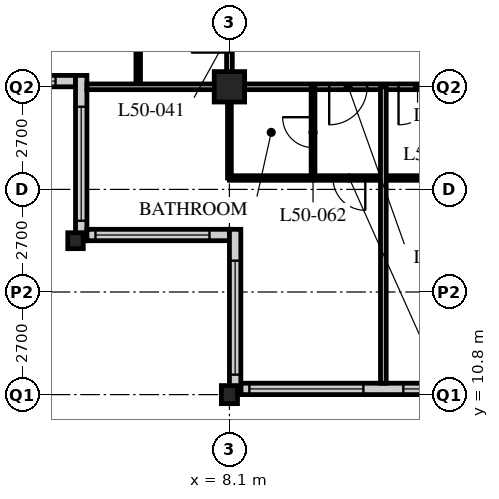
"""IFC4 building model, lengths in metres.
Left out: names, types, materials, properties, quantities, classifications, styles, units other than length and angle.
Written with IfcOpenShell. Run it as: python <this file> out.ifc"""

import sys

from ifc_helpers import new_model, si_unit, direction, frame, frame_2d, origin, origin_2d, place, context, subcontext, project, spatial, rectangle, hollow_rectangle, i_section, extrude, element, fill, save


model = new_model("IFC4")
c1 = context("Model", 3, precision=1e-05, world=origin(), true_north=direction((0.0, 1.0)))
c2 = subcontext(c1, "Body", "Model", "MODEL_VIEW")
j1 = project(units=[si_unit("LENGTHUNIT", "METRE"), si_unit("PLANEANGLEUNIT", "RADIAN")], contexts=[c1])
p1 = place(None, origin())
s1 = spatial("IfcSite", under=j1, at=p1, CompositionType="ELEMENT")
p2 = place(p1, origin())
s2 = spatial("IfcBuilding", under=s1, at=p2, CompositionType="ELEMENT")
p3 = place(p2, frame((0.0, 0.0, 195.6)))
s3 = spatial("IfcBuildingStorey", under=s2, at=p3, CompositionType="ELEMENT", Elevation=195.6)
p4 = place(p3, frame((4.05, 14.85, 0.0), z_axis=(0.0, 0.0, 1.0), x_axis=(1.0, 0.0, 0.0)))
e1 = element("IfcColumn", 1, at=p4, inside=s3, PredefinedType="COLUMN", context=c2, shape_type="SweptSolid", body=[
    extrude(i_section(OverallWidth=0.407, OverallDepth=0.419, WebThickness=0.031, FlangeThickness=0.049, FilletRadius=0.015, at=origin_2d()), origin(), (0.0, 0.0, 1.0), 3.6),
])
p5 = place(p3, frame((8.1, 10.8, 0.0), z_axis=(0.0, 0.0, 1.0), x_axis=(1.0, 0.0, 0.0)))
e2 = element("IfcColumn", 2, at=p5, inside=s3, PredefinedType="COLUMN", context=c2, shape_type="SweptSolid", body=[
    extrude(i_section(OverallWidth=0.424, OverallDepth=0.475, WebThickness=0.048, FlangeThickness=0.077, FilletRadius=0.015, at=origin_2d()), origin(), (0.0, 0.0, 1.0), 3.6),
])
p6 = place(p3, frame((8.1, 18.9, 0.0), z_axis=(0.0, 0.0, 1.0), x_axis=(1.0, 0.0, 0.0)))
e3 = element("IfcColumn", 3, at=p6, inside=s3, PredefinedType="COLUMN", context=c2, shape_type="SweptSolid", body=[
    extrude(hollow_rectangle(XDim=0.8, YDim=0.8, WallThickness=0.08, at=origin_2d()), origin(), (0.0, 0.0, 1.0), 3.6),
])
p7 = place(p3, frame((8.4, 10.95, 0.0), z_axis=(0.0, 0.0, 1.0), x_axis=(1.0, 0.0, 0.0)))
e4 = element("IfcWall", 4, at=p7, inside=s3, PredefinedType="SOLIDWALL", context=c2, shape_type="SweptSolid", body=[
    extrude(rectangle(XDim=40.2, YDim=0.3, at=frame_2d((20.1, 0.0))), origin(), (0.0, 0.0, 1.0), 3.39),
])
p8 = place(p7, frame((0.225, 0.0, 0.6)))
e5 = element("IfcOpeningElement", 5, at=p8, cuts=e4, PredefinedType="OPENING", context=c2, shape_type="SweptSolid", body=[
    extrude(rectangle(XDim=3.0, YDim=2.4, at=frame_2d((1.5, 1.2))), frame((0.0, 0.16, 0.0), z_axis=(0.0, -1.0, 0.0), x_axis=(1.0, 0.0, 0.0)), (0.0, 0.0, 1.0), 0.32),
])
p9 = place(p7, frame((4.275, 0.0, 0.6)))
e6 = element("IfcOpeningElement", 6, at=p9, cuts=e4, PredefinedType="OPENING", context=c2, shape_type="SweptSolid", body=[
    extrude(rectangle(XDim=3.0, YDim=2.4, at=frame_2d((1.5, 1.2))), frame((0.0, 0.16, 0.0), z_axis=(0.0, -1.0, 0.0), x_axis=(1.0, 0.0, 0.0)), (0.0, 0.0, 1.0), 0.32),
])
p10 = place(p7, frame((8.325, 0.0, 0.6)))
e7 = element("IfcOpeningElement", 7, at=p10, cuts=e4, PredefinedType="OPENING", context=c2, shape_type="SweptSolid", body=[
    extrude(rectangle(XDim=3.0, YDim=2.4, at=frame_2d((1.5, 1.2))), frame((0.0, 0.16, 0.0), z_axis=(0.0, -1.0, 0.0), x_axis=(1.0, 0.0, 0.0)), (0.0, 0.0, 1.0), 0.32),
])
p11 = place(p7, frame((12.375, 0.0, 0.6)))
e8 = element("IfcOpeningElement", 8, at=p11, cuts=e4, PredefinedType="OPENING", context=c2, shape_type="SweptSolid", body=[
    extrude(rectangle(XDim=3.0, YDim=2.4, at=frame_2d((1.5, 1.2))), frame((0.0, 0.16, 0.0), z_axis=(0.0, -1.0, 0.0), x_axis=(1.0, 0.0, 0.0)), (0.0, 0.0, 1.0), 0.32),
])
p12 = place(p7, frame((16.425, 0.0, 0.6)))
e9 = element("IfcOpeningElement", 9, at=p12, cuts=e4, PredefinedType="OPENING", context=c2, shape_type="SweptSolid", body=[
    extrude(rectangle(XDim=3.0, YDim=2.4, at=frame_2d((1.5, 1.2))), frame((0.0, 0.16, 0.0), z_axis=(0.0, -1.0, 0.0), x_axis=(1.0, 0.0, 0.0)), (0.0, 0.0, 1.0), 0.32),
])
p13 = place(p7, frame((20.475, 0.0, 0.6)))
e10 = element("IfcOpeningElement", 10, at=p13, cuts=e4, PredefinedType="OPENING", context=c2, shape_type="SweptSolid", body=[
    extrude(rectangle(XDim=3.0, YDim=2.4, at=frame_2d((1.5, 1.2))), frame((0.0, 0.16, 0.0), z_axis=(0.0, -1.0, 0.0), x_axis=(1.0, 0.0, 0.0)), (0.0, 0.0, 1.0), 0.32),
])
p14 = place(p7, frame((24.525, 0.0, 0.6)))
e11 = element("IfcOpeningElement", 11, at=p14, cuts=e4, PredefinedType="OPENING", context=c2, shape_type="SweptSolid", body=[
    extrude(rectangle(XDim=3.0, YDim=2.4, at=frame_2d((1.5, 1.2))), frame((0.0, 0.16, 0.0), z_axis=(0.0, -1.0, 0.0), x_axis=(1.0, 0.0, 0.0)), (0.0, 0.0, 1.0), 0.32),
])
p15 = place(p7, frame((28.575, 0.0, 0.6)))
e12 = element("IfcOpeningElement", 12, at=p15, cuts=e4, PredefinedType="OPENING", context=c2, shape_type="SweptSolid", body=[
    extrude(rectangle(XDim=3.0, YDim=2.4, at=frame_2d((1.5, 1.2))), frame((0.0, 0.16, 0.0), z_axis=(0.0, -1.0, 0.0), x_axis=(1.0, 0.0, 0.0)), (0.0, 0.0, 1.0), 0.32),
])
p16 = place(p7, frame((32.625, 0.0, 0.6)))
e13 = element("IfcOpeningElement", 13, at=p16, cuts=e4, PredefinedType="OPENING", context=c2, shape_type="SweptSolid", body=[
    extrude(rectangle(XDim=3.0, YDim=2.4, at=frame_2d((1.5, 1.2))), frame((0.0, 0.16, 0.0), z_axis=(0.0, -1.0, 0.0), x_axis=(1.0, 0.0, 0.0)), (0.0, 0.0, 1.0), 0.32),
])
p17 = place(p7, frame((36.675, 0.0, 0.6)))
e14 = element("IfcOpeningElement", 14, at=p17, cuts=e4, PredefinedType="OPENING", context=c2, shape_type="SweptSolid", body=[
    extrude(rectangle(XDim=3.0, YDim=2.4, at=frame_2d((1.5, 1.2))), frame((0.0, 0.16, 0.0), z_axis=(0.0, -1.0, 0.0), x_axis=(1.0, 0.0, 0.0)), (0.0, 0.0, 1.0), 0.32),
])
p18 = place(p3, frame((0.3, 19.05, 0.0), z_axis=(0.0, 0.0, 1.0), x_axis=(1.0, 0.0, 0.0)))
e15 = element("IfcWall", 15, at=p18, inside=s3, PredefinedType="SOLIDWALL", context=c2, shape_type="SweptSolid", body=[
    extrude(rectangle(XDim=3.75, YDim=0.3, at=frame_2d((1.875, 0.0))), origin(), (0.0, 0.0, 1.0), 3.39),
])
p19 = place(p18, frame((0.225, 0.0, 0.6)))
e16 = element("IfcOpeningElement", 16, at=p19, cuts=e15, PredefinedType="OPENING", context=c2, shape_type="SweptSolid", body=[
    extrude(rectangle(XDim=3.0, YDim=2.0, at=frame_2d((1.5, 1.0))), frame((0.0, 0.16, 0.0), z_axis=(0.0, -1.0, 0.0), x_axis=(1.0, 0.0, 0.0)), (0.0, 0.0, 1.0), 0.32),
])
p20 = place(p3, frame((4.2, 19.2, 0.0), z_axis=(0.0, 0.0, 1.0), x_axis=(0.0, -1.0, 0.0)))
e17 = element("IfcWall", 17, at=p20, inside=s3, PredefinedType="SOLIDWALL", context=c2, shape_type="SweptSolid", body=[
    extrude(rectangle(XDim=4.35, YDim=0.3, at=frame_2d((2.175, 0.0))), origin(), (0.0, 0.0, 1.0), 3.39),
])
p21 = place(p20, frame((0.825, 0.0, 0.6)))
e18 = element("IfcOpeningElement", 18, at=p21, cuts=e17, PredefinedType="OPENING", context=c2, shape_type="SweptSolid", body=[
    extrude(rectangle(XDim=3.0, YDim=2.0, at=frame_2d((1.5, 1.0))), frame((0.0, 0.16, 0.0), z_axis=(0.0, -1.0, 0.0), x_axis=(1.0, 0.0, 0.0)), (0.0, 0.0, 1.0), 0.32),
])
p22 = place(p3, frame((4.35, 15.0, 0.0), z_axis=(0.0, 0.0, 1.0), x_axis=(1.0, 0.0, 0.0)))
e19 = element("IfcWall", 19, at=p22, inside=s3, PredefinedType="SOLIDWALL", context=c2, shape_type="SweptSolid", body=[
    extrude(rectangle(XDim=3.75, YDim=0.3, at=frame_2d((1.875, 0.0))), origin(), (0.0, 0.0, 1.0), 3.39),
])
p23 = place(p22, frame((0.225, 0.0, 0.6)))
e20 = element("IfcOpeningElement", 20, at=p23, cuts=e19, PredefinedType="OPENING", context=c2, shape_type="SweptSolid", body=[
    extrude(rectangle(XDim=3.0, YDim=2.0, at=frame_2d((1.5, 1.0))), frame((0.0, 0.16, 0.0), z_axis=(0.0, -1.0, 0.0), x_axis=(1.0, 0.0, 0.0)), (0.0, 0.0, 1.0), 0.32),
])
p24 = place(p3, frame((8.25, 15.15, 0.0), z_axis=(0.0, 0.0, 1.0), x_axis=(0.0, -1.0, 0.0)))
e21 = element("IfcWall", 21, at=p24, inside=s3, PredefinedType="SOLIDWALL", context=c2, shape_type="SweptSolid", body=[
    extrude(rectangle(XDim=4.35, YDim=0.3, at=frame_2d((2.175, 0.0))), origin(), (0.0, 0.0, 1.0), 3.39),
])
p25 = place(p24, frame((0.825, 0.0, 0.6)))
e22 = element("IfcOpeningElement", 22, at=p25, cuts=e21, PredefinedType="OPENING", context=c2, shape_type="SweptSolid", body=[
    extrude(rectangle(XDim=3.0, YDim=2.0, at=frame_2d((1.5, 1.0))), frame((0.0, 0.16, 0.0), z_axis=(0.0, -1.0, 0.0), x_axis=(1.0, 0.0, 0.0)), (0.0, 0.0, 1.0), 0.32),
])
p26 = place(p3, frame((8.1, 18.9, 0.0), z_axis=(0.0, 0.0, 1.0), x_axis=(1.0, 0.0, 0.0)))
e23 = element("IfcWall", 23, at=p26, inside=s3, PredefinedType="PARTITIONING", context=c2, shape_type="SweptSolid", body=[
    extrude(rectangle(XDim=40.5, YDim=0.15, at=frame_2d((20.25, 0.0))), origin(), (0.0, 0.0, 1.0), 2.778),
])
p27 = place(p26, frame((4.45, 0.0, 0.0)))
e24 = element("IfcOpeningElement", 24, at=p27, cuts=e23, PredefinedType="OPENING", context=c2, shape_type="SweptSolid", body=[
    extrude(rectangle(XDim=1.0, YDim=2.1, at=frame_2d((0.5, 1.05))), frame((0.0, 0.085, 0.0), z_axis=(0.0, -1.0, 0.0), x_axis=(1.0, 0.0, 0.0)), (0.0, 0.0, 1.0), 0.17),
])
p28 = place(p26, frame((17.1, 0.0, 0.0)))
e25 = element("IfcOpeningElement", 25, at=p28, cuts=e23, PredefinedType="OPENING", context=c2, shape_type="SweptSolid", body=[
    extrude(rectangle(XDim=1.0, YDim=2.1, at=frame_2d((0.5, 1.05))), frame((0.0, 0.085, 0.0), z_axis=(0.0, -1.0, 0.0), x_axis=(1.0, 0.0, 0.0)), (0.0, 0.0, 1.0), 0.17),
])
p29 = place(p26, frame((28.75, 0.0, 0.0)))
e26 = element("IfcOpeningElement", 26, at=p29, cuts=e23, PredefinedType="OPENING", context=c2, shape_type="SweptSolid", body=[
    extrude(rectangle(XDim=1.0, YDim=2.1, at=frame_2d((0.5, 1.05))), frame((0.0, 0.085, 0.0), z_axis=(0.0, -1.0, 0.0), x_axis=(1.0, 0.0, 0.0)), (0.0, 0.0, 1.0), 0.17),
])
p30 = place(p26, frame((2.625, 0.0, 0.0)))
e27 = element("IfcOpeningElement", 27, at=p30, cuts=e23, PredefinedType="OPENING", context=c2, shape_type="SweptSolid", body=[
    extrude(rectangle(XDim=1.0, YDim=2.1, at=frame_2d((0.5, 1.05))), frame((0.0, 0.085, 0.0), z_axis=(0.0, -1.0, 0.0), x_axis=(1.0, 0.0, 0.0)), (0.0, 0.0, 1.0), 0.17),
])
p31 = place(p26, frame((36.875, 0.0, 0.0)))
e28 = element("IfcOpeningElement", 28, at=p31, cuts=e23, PredefinedType="OPENING", context=c2, shape_type="SweptSolid", body=[
    extrude(rectangle(XDim=1.0, YDim=2.1, at=frame_2d((0.5, 1.05))), frame((0.0, 0.085, 0.0), z_axis=(0.0, -1.0, 0.0), x_axis=(1.0, 0.0, 0.0)), (0.0, 0.0, 1.0), 0.17),
])
p32 = place(p3, frame((8.1, 18.9, 0.0), z_axis=(0.0, 0.0, 1.0), x_axis=(0.0, 1.0, 0.0)))
e29 = element("IfcWall", 29, at=p32, inside=s3, PredefinedType="PARTITIONING", context=c2, shape_type="SweptSolid", body=[
    extrude(rectangle(XDim=24.3, YDim=0.15, at=frame_2d((12.15, 0.0))), origin(), (0.0, 0.0, 1.0), 2.778),
])
p33 = place(p32, frame((0.9, 0.0, 0.0)))
e30 = element("IfcOpeningElement", 30, at=p33, cuts=e29, PredefinedType="OPENING", context=c2, shape_type="SweptSolid", body=[
    extrude(rectangle(XDim=1.0, YDim=2.1, at=frame_2d((0.5, 1.05))), frame((0.0, 0.085, 0.0), z_axis=(0.0, -1.0, 0.0), x_axis=(1.0, 0.0, 0.0)), (0.0, 0.0, 1.0), 0.17),
])
p34 = place(p32, frame((9.0, 0.0, 0.0)))
e31 = element("IfcOpeningElement", 31, at=p34, cuts=e29, PredefinedType="OPENING", context=c2, shape_type="SweptSolid", body=[
    extrude(rectangle(XDim=1.0, YDim=2.1, at=frame_2d((0.5, 1.05))), frame((0.0, 0.085, 0.0), z_axis=(0.0, -1.0, 0.0), x_axis=(1.0, 0.0, 0.0)), (0.0, 0.0, 1.0), 0.17),
])
p35 = place(p32, frame((17.1, 0.0, 0.0)))
e32 = element("IfcOpeningElement", 32, at=p35, cuts=e29, PredefinedType="OPENING", context=c2, shape_type="SweptSolid", body=[
    extrude(rectangle(XDim=1.0, YDim=2.1, at=frame_2d((0.5, 1.05))), frame((0.0, 0.085, 0.0), z_axis=(0.0, -1.0, 0.0), x_axis=(1.0, 0.0, 0.0)), (0.0, 0.0, 1.0), 0.17),
])
p36 = place(p3, frame((5.7, 18.9, 0.0), z_axis=(0.0, 0.0, 1.0), x_axis=(0.0, 1.0, 0.0)))
e33 = element("IfcWall", 33, at=p36, inside=s3, PredefinedType="PARTITIONING", context=c2, shape_type="SweptSolid", body=[
    extrude(rectangle(XDim=24.3, YDim=0.12, at=frame_2d((12.15, 0.0))), origin(), (0.0, 0.0, 1.0), 3.39),
])
p37 = place(p36, frame((0.975, 0.0, 0.0)))
e34 = element("IfcOpeningElement", 34, at=p37, cuts=e33, PredefinedType="OPENING", context=c2, shape_type="SweptSolid", body=[
    extrude(rectangle(XDim=0.85, YDim=2.1, at=frame_2d((0.425, 1.05))), frame((0.0, 0.07, 0.0), z_axis=(0.0, -1.0, 0.0), x_axis=(1.0, 0.0, 0.0)), (0.0, 0.0, 1.0), 0.14),
])
p38 = place(p36, frame((4.375, 0.0, 0.0)))
e35 = element("IfcOpeningElement", 35, at=p38, cuts=e33, PredefinedType="OPENING", context=c2, shape_type="SweptSolid", body=[
    extrude(rectangle(XDim=0.85, YDim=2.1, at=frame_2d((0.425, 1.05))), frame((0.0, 0.07, 0.0), z_axis=(0.0, -1.0, 0.0), x_axis=(1.0, 0.0, 0.0)), (0.0, 0.0, 1.0), 0.14),
])
p39 = place(p36, frame((9.075, 0.0, 0.0)))
e36 = element("IfcOpeningElement", 36, at=p39, cuts=e33, PredefinedType="OPENING", context=c2, shape_type="SweptSolid", body=[
    extrude(rectangle(XDim=0.85, YDim=2.1, at=frame_2d((0.425, 1.05))), frame((0.0, 0.07, 0.0), z_axis=(0.0, -1.0, 0.0), x_axis=(1.0, 0.0, 0.0)), (0.0, 0.0, 1.0), 0.14),
])
p40 = place(p36, frame((12.475, 0.0, 0.0)))
e37 = element("IfcOpeningElement", 37, at=p40, cuts=e33, PredefinedType="OPENING", context=c2, shape_type="SweptSolid", body=[
    extrude(rectangle(XDim=0.85, YDim=2.1, at=frame_2d((0.425, 1.05))), frame((0.0, 0.07, 0.0), z_axis=(0.0, -1.0, 0.0), x_axis=(1.0, 0.0, 0.0)), (0.0, 0.0, 1.0), 0.14),
])
p41 = place(p36, frame((17.175, 0.0, 0.0)))
e38 = element("IfcOpeningElement", 38, at=p41, cuts=e33, PredefinedType="OPENING", context=c2, shape_type="SweptSolid", body=[
    extrude(rectangle(XDim=0.85, YDim=2.1, at=frame_2d((0.425, 1.05))), frame((0.0, 0.07, 0.0), z_axis=(0.0, -1.0, 0.0), x_axis=(1.0, 0.0, 0.0)), (0.0, 0.0, 1.0), 0.14),
])
p42 = place(p36, frame((20.575, 0.0, 0.0)))
e39 = element("IfcOpeningElement", 39, at=p42, cuts=e33, PredefinedType="OPENING", context=c2, shape_type="SweptSolid", body=[
    extrude(rectangle(XDim=0.85, YDim=2.1, at=frame_2d((0.425, 1.05))), frame((0.0, 0.07, 0.0), z_axis=(0.0, -1.0, 0.0), x_axis=(1.0, 0.0, 0.0)), (0.0, 0.0, 1.0), 0.14),
])
p43 = place(p3, frame((8.1, 16.5, 0.0), z_axis=(0.0, 0.0, 1.0), x_axis=(1.0, 0.0, 0.0)))
e40 = element("IfcWall", 40, at=p43, inside=s3, PredefinedType="PARTITIONING", context=c2, shape_type="SweptSolid", body=[
    extrude(rectangle(XDim=40.5, YDim=0.12, at=frame_2d((20.25, 0.0))), origin(), (0.0, 0.0, 1.0), 3.39),
])
p44 = place(p43, frame((5.025, 0.0, 0.0)))
e41 = element("IfcOpeningElement", 41, at=p44, cuts=e40, PredefinedType="OPENING", context=c2, shape_type="SweptSolid", body=[
    extrude(rectangle(XDim=0.85, YDim=2.1, at=frame_2d((0.425, 1.05))), frame((0.0, 0.07, 0.0), z_axis=(0.0, -1.0, 0.0), x_axis=(1.0, 0.0, 0.0)), (0.0, 0.0, 1.0), 0.14),
])
p45 = place(p43, frame((12.475, 0.0, 0.0)))
e42 = element("IfcOpeningElement", 42, at=p45, cuts=e40, PredefinedType="OPENING", context=c2, shape_type="SweptSolid", body=[
    extrude(rectangle(XDim=0.85, YDim=2.1, at=frame_2d((0.425, 1.05))), frame((0.0, 0.07, 0.0), z_axis=(0.0, -1.0, 0.0), x_axis=(1.0, 0.0, 0.0)), (0.0, 0.0, 1.0), 0.14),
])
p46 = place(p43, frame((17.175, 0.0, 0.0)))
e43 = element("IfcOpeningElement", 43, at=p46, cuts=e40, PredefinedType="OPENING", context=c2, shape_type="SweptSolid", body=[
    extrude(rectangle(XDim=0.85, YDim=2.1, at=frame_2d((0.425, 1.05))), frame((0.0, 0.07, 0.0), z_axis=(0.0, -1.0, 0.0), x_axis=(1.0, 0.0, 0.0)), (0.0, 0.0, 1.0), 0.14),
])
p47 = place(p43, frame((24.625, 0.0, 0.0)))
e44 = element("IfcOpeningElement", 44, at=p47, cuts=e40, PredefinedType="OPENING", context=c2, shape_type="SweptSolid", body=[
    extrude(rectangle(XDim=0.85, YDim=2.1, at=frame_2d((0.425, 1.05))), frame((0.0, 0.07, 0.0), z_axis=(0.0, -1.0, 0.0), x_axis=(1.0, 0.0, 0.0)), (0.0, 0.0, 1.0), 0.14),
])
p48 = place(p43, frame((29.325, 0.0, 0.0)))
e45 = element("IfcOpeningElement", 45, at=p48, cuts=e40, PredefinedType="OPENING", context=c2, shape_type="SweptSolid", body=[
    extrude(rectangle(XDim=0.85, YDim=2.1, at=frame_2d((0.425, 1.05))), frame((0.0, 0.07, 0.0), z_axis=(0.0, -1.0, 0.0), x_axis=(1.0, 0.0, 0.0)), (0.0, 0.0, 1.0), 0.14),
])
p49 = place(p43, frame((32.725, 0.0, 0.0)))
e46 = element("IfcOpeningElement", 46, at=p49, cuts=e40, PredefinedType="OPENING", context=c2, shape_type="SweptSolid", body=[
    extrude(rectangle(XDim=0.85, YDim=2.1, at=frame_2d((0.425, 1.05))), frame((0.0, 0.07, 0.0), z_axis=(0.0, -1.0, 0.0), x_axis=(1.0, 0.0, 0.0)), (0.0, 0.0, 1.0), 0.14),
])
p50 = place(p43, frame((2.725, 0.0, 0.0)))
e47 = element("IfcOpeningElement", 47, at=p50, cuts=e40, PredefinedType="OPENING", context=c2, shape_type="SweptSolid", body=[
    extrude(rectangle(XDim=0.85, YDim=2.1, at=frame_2d((0.425, 1.05))), frame((0.0, 0.07, 0.0), z_axis=(0.0, -1.0, 0.0), x_axis=(1.0, 0.0, 0.0)), (0.0, 0.0, 1.0), 0.14),
])
p51 = place(p43, frame((36.925, 0.0, 0.0)))
e48 = element("IfcOpeningElement", 48, at=p51, cuts=e40, PredefinedType="OPENING", context=c2, shape_type="SweptSolid", body=[
    extrude(rectangle(XDim=0.85, YDim=2.1, at=frame_2d((0.425, 1.05))), frame((0.0, 0.07, 0.0), z_axis=(0.0, -1.0, 0.0), x_axis=(1.0, 0.0, 0.0)), (0.0, 0.0, 1.0), 0.14),
])
p52 = place(p3, frame((10.3, 18.9, 0.0), z_axis=(0.0, 0.0, 1.0), x_axis=(0.0, -1.0, 0.0)))
e49 = element("IfcWall", 49, at=p52, inside=s3, PredefinedType="PARTITIONING", context=c2, shape_type="SweptSolid", body=[
    extrude(rectangle(XDim=2.4, YDim=0.1, at=frame_2d((1.2, 0.0))), origin(), (0.0, 0.0, 1.0), 3.39),
])
p53 = place(p52, frame((0.8, 0.0, 0.0)))
e50 = element("IfcOpeningElement", 50, at=p53, cuts=e49, PredefinedType="OPENING", context=c2, shape_type="SweptSolid", body=[
    extrude(rectangle(XDim=0.8, YDim=2.1, at=frame_2d((0.4, 1.05))), frame((0.0, 0.06, 0.0), z_axis=(0.0, -1.0, 0.0), x_axis=(1.0, 0.0, 0.0)), (0.0, 0.0, 1.0), 0.12),
])
p54 = place(p3, frame((8.1, 18.9, 0.0), z_axis=(0.0, 0.0, 1.0), x_axis=(0.0, -1.0, 0.0)))
e51 = element("IfcWall", 51, at=p54, inside=s3, PredefinedType="PARTITIONING", context=c2, shape_type="SweptSolid", body=[
    extrude(rectangle(XDim=2.4, YDim=0.1, at=frame_2d((1.2, 0.0))), origin(), (0.0, 0.0, 1.0), 2.778),
])
p55 = place(p3, frame((4.35, 18.9, 0.0), z_axis=(0.0, 0.0, 1.0), x_axis=(1.0, 0.0, 0.0)))
e52 = element("IfcWall", 52, at=p55, inside=s3, PredefinedType="PARTITIONING", context=c2, shape_type="SweptSolid", body=[
    extrude(rectangle(XDim=3.75, YDim=0.15, at=frame_2d((1.875, 0.0))), origin(), (0.0, 0.0, 1.0), 2.778),
])
p56 = place(p3, frame((12.15, 18.9, 0.0), z_axis=(0.0, 0.0, 1.0), x_axis=(0.0, -1.0, 0.0)))
e53 = element("IfcWall", 53, at=p56, inside=s3, PredefinedType="PARTITIONING", context=c2, shape_type="SweptSolid", body=[
    extrude(rectangle(XDim=7.8, YDim=0.15, at=frame_2d((3.9, 0.0))), origin(), (0.0, 0.0, 1.0), 3.39),
])
p57 = place(p8, origin())
e54 = element("IfcWindow", 54, at=p57, inside=s3, PartitioningType="SINGLE_PANEL", PredefinedType="WINDOW", context=c2, shape_type="SweptSolid", body=[
    extrude(rectangle(XDim=3.0, YDim=2.4, at=frame_2d((1.5, 1.2))), frame((0.0, 0.03, 0.0), z_axis=(0.0, -1.0, 0.0), x_axis=(1.0, 0.0, 0.0)), (0.0, 0.0, 1.0), 0.06),
])
fill(e5, e54)
p58 = place(p9, origin())
e55 = element("IfcWindow", 55, at=p58, inside=s3, PartitioningType="SINGLE_PANEL", PredefinedType="WINDOW", context=c2, shape_type="SweptSolid", body=[
    extrude(rectangle(XDim=3.0, YDim=2.4, at=frame_2d((1.5, 1.2))), frame((0.0, 0.03, 0.0), z_axis=(0.0, -1.0, 0.0), x_axis=(1.0, 0.0, 0.0)), (0.0, 0.0, 1.0), 0.06),
])
fill(e6, e55)
p59 = place(p19, origin())
e56 = element("IfcWindow", 56, at=p59, inside=s3, PartitioningType="SINGLE_PANEL", PredefinedType="WINDOW", context=c2, shape_type="SweptSolid", body=[
    extrude(rectangle(XDim=3.0, YDim=2.0, at=frame_2d((1.5, 1.0))), frame((0.0, 0.03, 0.0), z_axis=(0.0, -1.0, 0.0), x_axis=(1.0, 0.0, 0.0)), (0.0, 0.0, 1.0), 0.06),
])
fill(e16, e56)
p60 = place(p21, origin())
e57 = element("IfcWindow", 57, at=p60, inside=s3, PartitioningType="SINGLE_PANEL", PredefinedType="WINDOW", context=c2, shape_type="SweptSolid", body=[
    extrude(rectangle(XDim=3.0, YDim=2.0, at=frame_2d((1.5, 1.0))), frame((0.0, 0.03, 0.0), z_axis=(0.0, -1.0, 0.0), x_axis=(1.0, 0.0, 0.0)), (0.0, 0.0, 1.0), 0.06),
])
fill(e18, e57)
p61 = place(p23, origin())
e58 = element("IfcWindow", 58, at=p61, inside=s3, PartitioningType="SINGLE_PANEL", PredefinedType="WINDOW", context=c2, shape_type="SweptSolid", body=[
    extrude(rectangle(XDim=3.0, YDim=2.0, at=frame_2d((1.5, 1.0))), frame((0.0, 0.03, 0.0), z_axis=(0.0, -1.0, 0.0), x_axis=(1.0, 0.0, 0.0)), (0.0, 0.0, 1.0), 0.06),
])
fill(e20, e58)
p62 = place(p25, origin())
e59 = element("IfcWindow", 59, at=p62, inside=s3, PartitioningType="SINGLE_PANEL", PredefinedType="WINDOW", context=c2, shape_type="SweptSolid", body=[
    extrude(rectangle(XDim=3.0, YDim=2.0, at=frame_2d((1.5, 1.0))), frame((0.0, 0.03, 0.0), z_axis=(0.0, -1.0, 0.0), x_axis=(1.0, 0.0, 0.0)), (0.0, 0.0, 1.0), 0.06),
])
fill(e22, e59)
p63 = place(p27, origin())
e60 = element("IfcDoor", 60, at=p63, inside=s3, OperationType="SINGLE_SWING_RIGHT", PredefinedType="DOOR", context=c2, shape_type="SweptSolid", body=[
    extrude(rectangle(XDim=1.0, YDim=2.1, at=frame_2d((0.5, 1.05))), frame((0.0, 0.025, 0.0), z_axis=(0.0, -1.0, 0.0), x_axis=(1.0, 0.0, 0.0)), (0.0, 0.0, 1.0), 0.05),
])
fill(e24, e60)
p64 = place(p33, origin())
e61 = element("IfcDoor", 61, at=p64, inside=s3, OperationType="SINGLE_SWING_LEFT", PredefinedType="DOOR", context=c2, shape_type="SweptSolid", body=[
    extrude(rectangle(XDim=1.0, YDim=2.1, at=frame_2d((0.5, 1.05))), frame((0.0, 0.025, 0.0), z_axis=(0.0, -1.0, 0.0), x_axis=(1.0, 0.0, 0.0)), (0.0, 0.0, 1.0), 0.05),
])
fill(e30, e61)
p65 = place(p53, origin())
e62 = element("IfcDoor", 62, at=p65, inside=s3, OperationType="SINGLE_SWING_RIGHT", PredefinedType="DOOR", context=c2, shape_type="SweptSolid", body=[
    extrude(rectangle(XDim=0.8, YDim=2.1, at=frame_2d((0.4, 1.05))), frame((0.0, 0.025, 0.0), z_axis=(0.0, -1.0, 0.0), x_axis=(1.0, 0.0, 0.0)), (0.0, 0.0, 1.0), 0.05),
])
fill(e50, e62)
p66 = place(p30, origin())
e63 = element("IfcDoor", 63, at=p66, inside=s3, OperationType="SINGLE_SWING_RIGHT", PredefinedType="DOOR", context=c2, shape_type="SweptSolid", body=[
    extrude(rectangle(XDim=1.0, YDim=2.1, at=frame_2d((0.5, 1.05))), frame((0.0, 0.025, 0.0), z_axis=(0.0, -1.0, 0.0), x_axis=(1.0, 0.0, 0.0)), (0.0, 0.0, 1.0), 0.05),
])
fill(e27, e63)
p67 = place(p50, origin())
e64 = element("IfcDoor", 64, at=p67, inside=s3, OperationType="SINGLE_SWING_LEFT", PredefinedType="DOOR", context=c2, shape_type="SweptSolid", body=[
    extrude(rectangle(XDim=0.85, YDim=2.1, at=frame_2d((0.425, 1.05))), frame((0.0, 0.025, 0.0), z_axis=(0.0, -1.0, 0.0), x_axis=(1.0, 0.0, 0.0)), (0.0, 0.0, 1.0), 0.05),
])
fill(e47, e64)
save(model, sys.argv[1])
